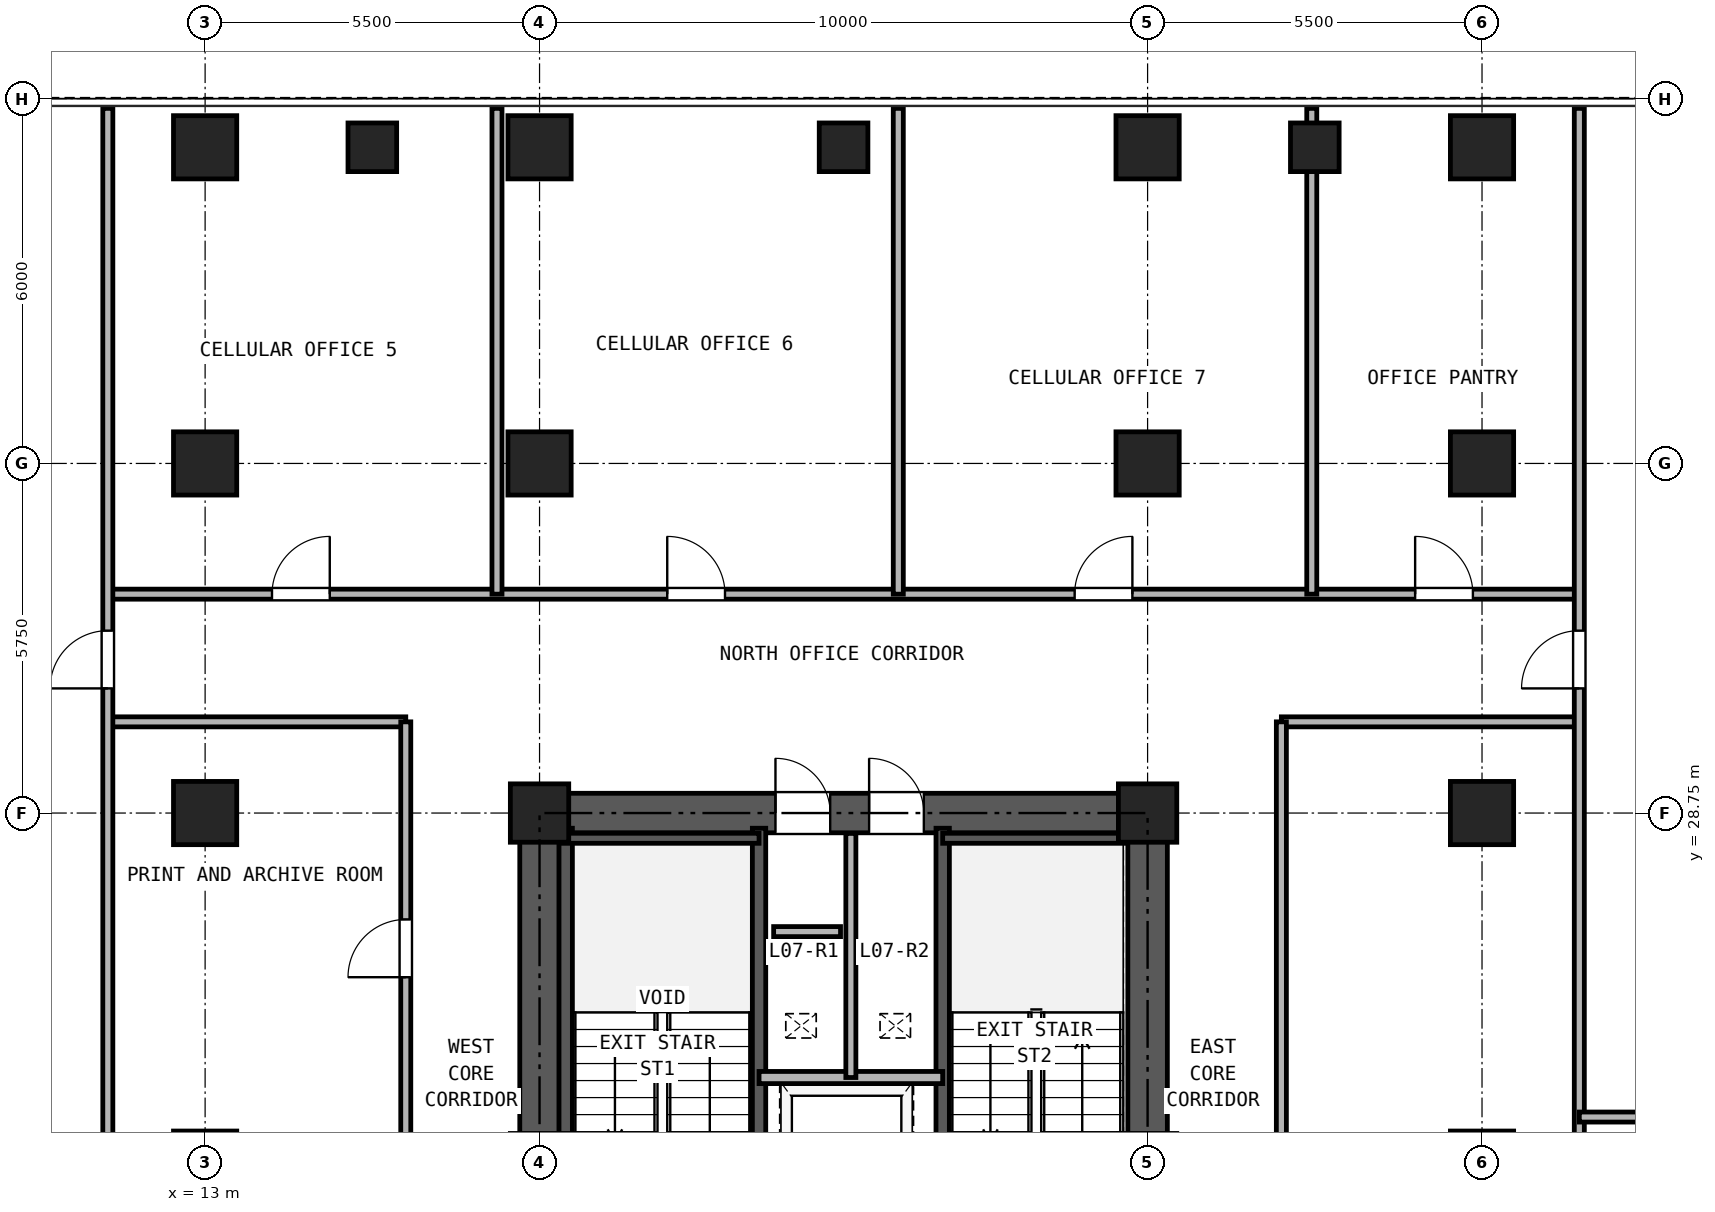
"""IFC4 building model, lengths in metres.
Left out: names, types, materials, properties, quantities, classifications, styles, units other than length and angle.
Written with IfcOpenShell. Run it as: python <this file> out.ifc"""

import sys

from ifc_helpers import new_model, si_unit, direction, frame, frame_2d, origin, origin_2d, place, context, subcontext, project, spatial, rectangle, hollow_rectangle, extrude, source, transform, mapped, element, fill, save


model = new_model("IFC4")
c1 = context("Model", 3, precision=1e-05, world=origin(), true_north=direction((0.0, 1.0)))
c2 = subcontext(c1, "Body", "Model", "MODEL_VIEW")
j1 = project(units=[si_unit("LENGTHUNIT", "METRE"), si_unit("PLANEANGLEUNIT", "RADIAN")], contexts=[c1])
p1 = place(None, origin())
s1 = spatial("IfcSite", under=j1, at=p1, CompositionType="ELEMENT")
p2 = place(p1, origin())
s2 = spatial("IfcBuilding", under=s1, at=p2, CompositionType="ELEMENT")
p3 = place(p2, frame((0.0, 0.0, 29.7)))
s3 = spatial("IfcBuildingStorey", under=s2, at=p3, CompositionType="ELEMENT", Elevation=29.7)
m1 = source(origin(), c2, "Body", "SweptSolid", [
    extrude(hollow_rectangle(XDim=1.04, YDim=1.04, WallThickness=0.065, at=origin_2d()), origin(), (0.0, 0.0, 1.0), 3.32),
])
for number, where, z_axis, x_axis in (
    (1, (13.0, 39.7, 0.0), (0.0, 0.0, 1.0), (1.0, 0.0, 0.0)),
    (2, (18.5, 39.7, 0.0), (0.0, 0.0, 1.0), (1.0, 0.0, 0.0)),
    (3, (28.5, 39.7, 0.0), (0.0, 0.0, 1.0), (1.0, 0.0, 0.0)),
    (4, (34.0, 39.7, 0.0), (0.0, 0.0, 1.0), (1.0, 0.0, 0.0)),
    (5, (13.0, 23.0, 0.0), (0.0, 0.0, 1.0), (1.0, 0.0, 0.0)),
    (6, (13.0, 28.75, 0.0), (0.0, 0.0, 1.0), (1.0, 0.0, 0.0)),
    (7, (13.0, 34.5, 0.0), (0.0, 0.0, 1.0), (1.0, 0.0, 0.0)),
):
    element("IfcColumn", number, at=place(p3, frame(where, z_axis=z_axis, x_axis=x_axis)), inside=s3, PredefinedType="COLUMN", context=c2, shape_type="MappedRepresentation", body=[
        mapped(m1, transform((0.0, 0.0, 0.0), x_axis=(1.0, 0.0, 0.0), y_axis=(0.0, 1.0, 0.0), z_axis=(0.0, 0.0, 1.0), scale=1.0)),
    ])
m2 = source(origin(), c2, "Body", "SweptSolid", [
    extrude(hollow_rectangle(XDim=0.96, YDim=0.96, WallThickness=0.06, at=origin_2d()), origin(), (0.0, 0.0, 1.0), 3.32),
])
p4 = place(p3, frame((18.5, 28.75, 0.0), z_axis=(0.0, 0.0, 1.0), x_axis=(1.0, 0.0, 0.0)))
e8 = element("IfcColumn", 8, at=p4, inside=s3, PredefinedType="COLUMN", context=c2, shape_type="MappedRepresentation", body=[
    mapped(m2, transform((0.0, 0.0, 0.0), x_axis=(1.0, 0.0, 0.0), y_axis=(0.0, 1.0, 0.0), z_axis=(0.0, 0.0, 1.0), scale=1.0)),
])
p5 = place(p3, frame((18.5, 34.5, 0.0), z_axis=(0.0, 0.0, 1.0), x_axis=(1.0, 0.0, 0.0)))
e9 = element("IfcColumn", 9, at=p5, inside=s3, PredefinedType="COLUMN", context=c2, shape_type="MappedRepresentation", body=[
    mapped(m1, transform((0.0, 0.0, 0.0), x_axis=(1.0, 0.0, 0.0), y_axis=(0.0, 1.0, 0.0), z_axis=(0.0, 0.0, 1.0), scale=1.0)),
])
p6 = place(p3, frame((28.5, 28.75, 0.0), z_axis=(0.0, 0.0, 1.0), x_axis=(1.0, 0.0, 0.0)))
e10 = element("IfcColumn", 10, at=p6, inside=s3, PredefinedType="COLUMN", context=c2, shape_type="MappedRepresentation", body=[
    mapped(m2, transform((0.0, 0.0, 0.0), x_axis=(1.0, 0.0, 0.0), y_axis=(0.0, 1.0, 0.0), z_axis=(0.0, 0.0, 1.0), scale=1.0)),
])
for number, where, z_axis, x_axis in (
    (11, (28.5, 34.5, 0.0), (0.0, 0.0, 1.0), (1.0, 0.0, 0.0)),
    (12, (34.0, 23.0, 0.0), (0.0, 0.0, 1.0), (1.0, 0.0, 0.0)),
    (13, (34.0, 28.75, 0.0), (0.0, 0.0, 1.0), (1.0, 0.0, 0.0)),
    (14, (34.0, 34.5, 0.0), (0.0, 0.0, 1.0), (1.0, 0.0, 0.0)),
):
    element("IfcColumn", number, at=place(p3, frame(where, z_axis=z_axis, x_axis=x_axis)), inside=s3, PredefinedType="COLUMN", context=c2, shape_type="MappedRepresentation", body=[
        mapped(m1, transform((0.0, 0.0, 0.0), x_axis=(1.0, 0.0, 0.0), y_axis=(0.0, 1.0, 0.0), z_axis=(0.0, 0.0, 1.0), scale=1.0)),
    ])
m3 = source(origin(), c2, "Body", "SweptSolid", [
    extrude(hollow_rectangle(XDim=0.8, YDim=0.8, WallThickness=0.045, at=origin_2d()), origin(), (0.0, 0.0, 1.0), 3.32),
])
for number, where, z_axis, x_axis in (
    (15, (15.75, 39.7, 0.0), (0.0, 0.0, 1.0), (1.0, 0.0, 0.0)),
    (16, (23.5, 39.7, 0.0), (0.0, 0.0, 1.0), (1.0, 0.0, 0.0)),
    (17, (31.25, 39.7, 0.0), (0.0, 0.0, 1.0), (1.0, 0.0, 0.0)),
):
    element("IfcColumn", number, at=place(p3, frame(where, z_axis=z_axis, x_axis=x_axis)), inside=s3, PredefinedType="COLUMN", context=c2, shape_type="MappedRepresentation", body=[
        mapped(m3, transform((0.0, 0.0, 0.0), x_axis=(1.0, 0.0, 0.0), y_axis=(0.0, 1.0, 0.0), z_axis=(0.0, 0.0, 1.0), scale=1.0)),
    ])
p7 = place(p3, frame((18.175, 28.75, 0.0), z_axis=(0.0, 0.0, 1.0), x_axis=(1.0, 0.0, 0.0)))
e18 = element("IfcWall", 18, at=p7, inside=s3, PredefinedType="SHEAR", context=c2, shape_type="SweptSolid", body=[
    extrude(rectangle(XDim=10.65, YDim=0.65, at=frame_2d((5.325, 0.0))), origin(), (0.0, 0.0, 1.0), 3.32),
])
p8 = place(p7, frame((4.205, 0.0, 0.0)))
e19 = element("IfcOpeningElement", 19, at=p8, cuts=e18, PredefinedType="OPENING", context=c2, shape_type="SweptSolid", body=[
    extrude(rectangle(XDim=0.9, YDim=2.05, at=frame_2d((0.45, 1.025))), frame((0.0, 0.335, 0.0), z_axis=(0.0, -1.0, 0.0), x_axis=(1.0, 0.0, 0.0)), (0.0, 0.0, 1.0), 0.67),
])
p9 = place(p7, frame((5.745, 0.0, 0.0)))
e20 = element("IfcOpeningElement", 20, at=p9, cuts=e18, PredefinedType="OPENING", context=c2, shape_type="SweptSolid", body=[
    extrude(rectangle(XDim=0.9, YDim=2.05, at=frame_2d((0.45, 1.025))), frame((0.0, 0.335, 0.0), z_axis=(0.0, -1.0, 0.0), x_axis=(1.0, 0.0, 0.0)), (0.0, 0.0, 1.0), 0.67),
])
p10 = place(p3, frame((18.5, 11.825, 0.0), z_axis=(0.0, 0.0, 1.0), x_axis=(0.0, 1.0, 0.0)))
e21 = element("IfcWall", 21, at=p10, inside=s3, PredefinedType="SHEAR", context=c2, shape_type="SweptSolid", body=[
    extrude(rectangle(XDim=16.6, YDim=0.65, at=frame_2d((8.3, 0.0))), origin(), (0.0, 0.0, 1.0), 3.32),
])
p11 = place(p10, frame((7.325, 0.0, 0.0)))
e22 = element("IfcOpeningElement", 22, at=p11, cuts=e21, PredefinedType="OPENING", context=c2, shape_type="SweptSolid", body=[
    extrude(rectangle(XDim=1.15, YDim=2.2, at=frame_2d((0.575, 1.1))), frame((0.0, 0.335, 0.0), z_axis=(0.0, -1.0, 0.0), x_axis=(1.0, 0.0, 0.0)), (0.0, 0.0, 1.0), 0.67),
])
p12 = place(p3, frame((28.5, 11.825, 0.0), z_axis=(0.0, 0.0, 1.0), x_axis=(0.0, 1.0, 0.0)))
e23 = element("IfcWall", 23, at=p12, inside=s3, PredefinedType="SHEAR", context=c2, shape_type="SweptSolid", body=[
    extrude(rectangle(XDim=16.6, YDim=0.65, at=frame_2d((8.3, 0.0))), origin(), (0.0, 0.0, 1.0), 3.32),
])
p13 = place(p12, frame((7.325, 0.0, 0.0)))
e24 = element("IfcOpeningElement", 24, at=p13, cuts=e23, PredefinedType="OPENING", context=c2, shape_type="SweptSolid", body=[
    extrude(rectangle(XDim=1.15, YDim=2.2, at=frame_2d((0.575, 1.1))), frame((0.0, 0.335, 0.0), z_axis=(0.0, -1.0, 0.0), x_axis=(1.0, 0.0, 0.0)), (0.0, 0.0, 1.0), 0.67),
])
for number, where, z_axis, x_axis in (
    (25, (18.93, 21.39, 0.0), (0.0, 0.0, 1.0), (0.0, 1.0, 0.0)),
    (26, (22.11, 21.39, 0.0), (0.0, 0.0, 1.0), (0.0, 1.0, 0.0)),
    (27, (25.13, 21.39, 0.0), (0.0, 0.0, 1.0), (0.0, 1.0, 0.0)),
):
    element("IfcWall", number, at=place(p3, frame(where, z_axis=z_axis, x_axis=x_axis)), inside=s3, PredefinedType="SOLIDWALL", context=c2, shape_type="SweptSolid", body=[
        extrude(rectangle(XDim=7.11, YDim=0.22, at=frame_2d((3.555, 0.0))), origin(), (0.0, 0.0, 1.0), 3.32),
    ])
p14 = place(p3, frame((18.835, 28.335, 0.0), z_axis=(0.0, 0.0, 1.0), x_axis=(1.0, 0.0, 0.0)))
e28 = element("IfcWall", 28, at=p14, inside=s3, PredefinedType="PARTITIONING", context=c2, shape_type="SweptSolid", body=[
    extrude(rectangle(XDim=3.275, YDim=0.165, at=frame_2d((1.638, 0.0))), origin(), (0.0, 0.0, 1.0), 3.32),
])
p15 = place(p3, frame((25.13, 28.335, 0.0), z_axis=(0.0, 0.0, 1.0), x_axis=(1.0, 0.0, 0.0)))
e29 = element("IfcWall", 29, at=p15, inside=s3, PredefinedType="PARTITIONING", context=c2, shape_type="SweptSolid", body=[
    extrude(rectangle(XDim=3.035, YDim=0.165, at=frame_2d((1.518, 0.0))), origin(), (0.0, 0.0, 1.0), 3.32),
])
p16 = place(p3, frame((22.11, 24.4, 0.0), z_axis=(0.0, 0.0, 1.0), x_axis=(1.0, 0.0, 0.0)))
e30 = element("IfcWall", 30, at=p16, inside=s3, PredefinedType="PARTITIONING", context=c2, shape_type="SweptSolid", body=[
    extrude(rectangle(XDim=3.02, YDim=0.2, at=frame_2d((1.51, 0.0))), origin(), (0.0, 0.0, 1.0), 3.32),
])
p17 = place(p3, frame((23.62, 24.4, 0.0), z_axis=(0.0, 0.0, 1.0), x_axis=(0.0, 1.0, 0.0)))
e31 = element("IfcWall", 31, at=p17, inside=s3, PredefinedType="PARTITIONING", context=c2, shape_type="SweptSolid", body=[
    extrude(rectangle(XDim=4.015, YDim=0.165, at=frame_2d((2.008, 0.0))), origin(), (0.0, 0.0, 1.0), 3.32),
])
p18 = place(p3, frame((11.4, 32.35, 0.0), z_axis=(0.0, 0.0, 1.0), x_axis=(1.0, 0.0, 0.0)))
e32 = element("IfcWall", 32, at=p18, inside=s3, PredefinedType="PARTITIONING", context=c2, shape_type="SweptSolid", body=[
    extrude(rectangle(XDim=24.2, YDim=0.165, at=frame_2d((12.1, 0.0))), origin(), (0.0, 0.0, 1.0), 3.32),
])
p19 = place(p18, frame((2.7, 0.0, 0.0)))
e33 = element("IfcOpeningElement", 33, at=p19, cuts=e32, PredefinedType="OPENING", context=c2, shape_type="SweptSolid", body=[
    extrude(rectangle(XDim=0.95, YDim=2.15, at=frame_2d((0.475, 1.075))), frame((0.0, 0.093, 0.0), z_axis=(0.0, -1.0, 0.0), x_axis=(1.0, 0.0, 0.0)), (0.0, 0.0, 1.0), 0.185),
])
p20 = place(p18, frame((9.2, 0.0, 0.0)))
e34 = element("IfcOpeningElement", 34, at=p20, cuts=e32, PredefinedType="OPENING", context=c2, shape_type="SweptSolid", body=[
    extrude(rectangle(XDim=0.95, YDim=2.15, at=frame_2d((0.475, 1.075))), frame((0.0, 0.093, 0.0), z_axis=(0.0, -1.0, 0.0), x_axis=(1.0, 0.0, 0.0)), (0.0, 0.0, 1.0), 0.185),
])
p21 = place(p18, frame((15.9, 0.0, 0.0)))
e35 = element("IfcOpeningElement", 35, at=p21, cuts=e32, PredefinedType="OPENING", context=c2, shape_type="SweptSolid", body=[
    extrude(rectangle(XDim=0.95, YDim=2.15, at=frame_2d((0.475, 1.075))), frame((0.0, 0.093, 0.0), z_axis=(0.0, -1.0, 0.0), x_axis=(1.0, 0.0, 0.0)), (0.0, 0.0, 1.0), 0.185),
])
p22 = place(p18, frame((21.5, 0.0, 0.0)))
e36 = element("IfcOpeningElement", 36, at=p22, cuts=e32, PredefinedType="OPENING", context=c2, shape_type="SweptSolid", body=[
    extrude(rectangle(XDim=0.95, YDim=2.15, at=frame_2d((0.475, 1.075))), frame((0.0, 0.093, 0.0), z_axis=(0.0, -1.0, 0.0), x_axis=(1.0, 0.0, 0.0)), (0.0, 0.0, 1.0), 0.185),
])
for number, where, z_axis, x_axis in (
    (37, (11.4, 30.25, 0.0), (0.0, 0.0, 1.0), (1.0, 0.0, 0.0)),
    (38, (30.7, 30.25, 0.0), (0.0, 0.0, 1.0), (1.0, 0.0, 0.0)),
):
    element("IfcWall", number, at=place(p3, frame(where, z_axis=z_axis, x_axis=x_axis)), inside=s3, PredefinedType="PARTITIONING", context=c2, shape_type="SweptSolid", body=[
        extrude(rectangle(XDim=4.9, YDim=0.165, at=frame_2d((2.45, 0.0))), origin(), (0.0, 0.0, 1.0), 3.32),
    ])
p23 = place(p3, frame((16.3, 9.45, 0.0), z_axis=(0.0, 0.0, 1.0), x_axis=(0.0, 1.0, 0.0)))
e39 = element("IfcWall", 39, at=p23, inside=s3, PredefinedType="PARTITIONING", context=c2, shape_type="SweptSolid", body=[
    extrude(rectangle(XDim=20.8, YDim=0.165, at=frame_2d((10.4, 0.0))), origin(), (0.0, 0.0, 1.0), 3.32),
])
p24 = place(p23, frame((6.2, 0.0, 0.0)))
e40 = element("IfcOpeningElement", 40, at=p24, cuts=e39, PredefinedType="OPENING", context=c2, shape_type="SweptSolid", body=[
    extrude(rectangle(XDim=0.95, YDim=2.15, at=frame_2d((0.475, 1.075))), frame((0.0, 0.093, 0.0), z_axis=(0.0, -1.0, 0.0), x_axis=(1.0, 0.0, 0.0)), (0.0, 0.0, 1.0), 0.185),
])
p25 = place(p23, frame((16.6, 0.0, 0.0)))
e41 = element("IfcOpeningElement", 41, at=p25, cuts=e39, PredefinedType="OPENING", context=c2, shape_type="SweptSolid", body=[
    extrude(rectangle(XDim=0.95, YDim=2.15, at=frame_2d((0.475, 1.075))), frame((0.0, 0.093, 0.0), z_axis=(0.0, -1.0, 0.0), x_axis=(1.0, 0.0, 0.0)), (0.0, 0.0, 1.0), 0.185),
])
p26 = place(p3, frame((30.7, 9.45, 0.0), z_axis=(0.0, 0.0, 1.0), x_axis=(0.0, 1.0, 0.0)))
e42 = element("IfcWall", 42, at=p26, inside=s3, PredefinedType="PARTITIONING", context=c2, shape_type="SweptSolid", body=[
    extrude(rectangle(XDim=20.8, YDim=0.165, at=frame_2d((10.4, 0.0))), origin(), (0.0, 0.0, 1.0), 3.32),
])
p27 = place(p26, frame((9.9, 0.0, 0.0)))
e43 = element("IfcOpeningElement", 43, at=p27, cuts=e42, PredefinedType="OPENING", context=c2, shape_type="SweptSolid", body=[
    extrude(rectangle(XDim=0.95, YDim=2.15, at=frame_2d((0.475, 1.075))), frame((0.0, 0.093, 0.0), z_axis=(0.0, -1.0, 0.0), x_axis=(1.0, 0.0, 0.0)), (0.0, 0.0, 1.0), 0.185),
])
p28 = place(p3, frame((11.4, 0.16, 0.0), z_axis=(0.0, 0.0, 1.0), x_axis=(0.0, 1.0, 0.0)))
e44 = element("IfcWall", 44, at=p28, inside=s3, PredefinedType="PARTITIONING", context=c2, shape_type="SweptSolid", body=[
    extrude(rectangle(XDim=40.18, YDim=0.165, at=frame_2d((20.09, 0.0))), origin(), (0.0, 0.0, 1.0), 3.32),
])
p29 = place(p28, frame((7.74, 0.0, 0.0)))
e45 = element("IfcOpeningElement", 45, at=p29, cuts=e44, PredefinedType="OPENING", context=c2, shape_type="SweptSolid", body=[
    extrude(rectangle(XDim=0.95, YDim=2.15, at=frame_2d((0.475, 1.075))), frame((0.0, 0.093, 0.0), z_axis=(0.0, -1.0, 0.0), x_axis=(1.0, 0.0, 0.0)), (0.0, 0.0, 1.0), 0.185),
])
p30 = place(p28, frame((30.64, 0.0, 0.0)))
e46 = element("IfcOpeningElement", 46, at=p30, cuts=e44, PredefinedType="OPENING", context=c2, shape_type="SweptSolid", body=[
    extrude(rectangle(XDim=0.95, YDim=2.15, at=frame_2d((0.475, 1.075))), frame((0.0, 0.093, 0.0), z_axis=(0.0, -1.0, 0.0), x_axis=(1.0, 0.0, 0.0)), (0.0, 0.0, 1.0), 0.185),
])
p31 = place(p3, frame((35.6, 0.16, 0.0), z_axis=(0.0, 0.0, 1.0), x_axis=(0.0, 1.0, 0.0)))
e47 = element("IfcWall", 47, at=p31, inside=s3, PredefinedType="PARTITIONING", context=c2, shape_type="SweptSolid", body=[
    extrude(rectangle(XDim=40.18, YDim=0.165, at=frame_2d((20.09, 0.0))), origin(), (0.0, 0.0, 1.0), 3.32),
])
p32 = place(p31, frame((7.74, 0.0, 0.0)))
e48 = element("IfcOpeningElement", 48, at=p32, cuts=e47, PredefinedType="OPENING", context=c2, shape_type="SweptSolid", body=[
    extrude(rectangle(XDim=0.95, YDim=2.15, at=frame_2d((0.475, 1.075))), frame((0.0, 0.093, 0.0), z_axis=(0.0, -1.0, 0.0), x_axis=(1.0, 0.0, 0.0)), (0.0, 0.0, 1.0), 0.185),
])
p33 = place(p31, frame((30.64, 0.0, 0.0)))
e49 = element("IfcOpeningElement", 49, at=p33, cuts=e47, PredefinedType="OPENING", context=c2, shape_type="SweptSolid", body=[
    extrude(rectangle(XDim=0.95, YDim=2.15, at=frame_2d((0.475, 1.075))), frame((0.0, 0.093, 0.0), z_axis=(0.0, -1.0, 0.0), x_axis=(1.0, 0.0, 0.0)), (0.0, 0.0, 1.0), 0.185),
])
for number, where, z_axis, x_axis in (
    (50, (17.8, 32.35, 0.0), (0.0, 0.0, 1.0), (0.0, 1.0, 0.0)),
    (51, (24.4, 32.35, 0.0), (0.0, 0.0, 1.0), (0.0, 1.0, 0.0)),
    (52, (31.2, 32.35, 0.0), (0.0, 0.0, 1.0), (0.0, 1.0, 0.0)),
):
    element("IfcWall", number, at=place(p3, frame(where, z_axis=z_axis, x_axis=x_axis)), inside=s3, PredefinedType="PARTITIONING", context=c2, shape_type="SweptSolid", body=[
        extrude(rectangle(XDim=7.99, YDim=0.165, at=frame_2d((3.995, 0.0))), origin(), (0.0, 0.0, 1.0), 3.32),
    ])
p34 = place(p3, frame((35.6, 23.75, 0.0), z_axis=(0.0, 0.0, 1.0), x_axis=(1.0, 0.0, 0.0)))
e53 = element("IfcWall", 53, at=p34, inside=s3, PredefinedType="PARTITIONING", context=c2, shape_type="SweptSolid", body=[
    extrude(rectangle(XDim=11.24, YDim=0.165, at=frame_2d((5.62, 0.0))), origin(), (0.0, 0.0, 1.0), 3.32),
])
p35 = place(p3, frame((22.35, 26.8, 0.0), z_axis=(0.0, 0.0, 1.0), x_axis=(1.0, 0.0, 0.0)))
e54 = element("IfcWall", 54, at=p35, inside=s3, PredefinedType="PARTITIONING", context=c2, shape_type="SweptSolid", body=[
    extrude(rectangle(XDim=1.1, YDim=0.165, at=frame_2d((0.55, 0.0))), origin(), (0.0, 0.0, 1.0), 3.32),
])
p36 = place(p8, origin())
e55 = element("IfcDoor", 55, at=p36, inside=s3, OperationType="SINGLE_SWING_LEFT", PredefinedType="DOOR", context=c2, shape_type="SweptSolid", body=[
    extrude(rectangle(XDim=0.9, YDim=2.05, at=frame_2d((0.45, 1.025))), frame((0.0, 0.025, 0.0), z_axis=(0.0, -1.0, 0.0), x_axis=(1.0, 0.0, 0.0)), (0.0, 0.0, 1.0), 0.05),
])
fill(e19, e55)
p37 = place(p9, origin())
e56 = element("IfcDoor", 56, at=p37, inside=s3, OperationType="SINGLE_SWING_LEFT", PredefinedType="DOOR", context=c2, shape_type="SweptSolid", body=[
    extrude(rectangle(XDim=0.9, YDim=2.05, at=frame_2d((0.45, 1.025))), frame((0.0, 0.025, 0.0), z_axis=(0.0, -1.0, 0.0), x_axis=(1.0, 0.0, 0.0)), (0.0, 0.0, 1.0), 0.05),
])
fill(e20, e56)
p38 = place(p19, origin())
e57 = element("IfcDoor", 57, at=p38, inside=s3, OperationType="SINGLE_SWING_RIGHT", PredefinedType="DOOR", context=c2, shape_type="SweptSolid", body=[
    extrude(rectangle(XDim=0.95, YDim=2.15, at=frame_2d((0.475, 1.075))), frame((0.0, 0.025, 0.0), z_axis=(0.0, -1.0, 0.0), x_axis=(1.0, 0.0, 0.0)), (0.0, 0.0, 1.0), 0.05),
])
fill(e33, e57)
p39 = place(p20, origin())
e58 = element("IfcDoor", 58, at=p39, inside=s3, OperationType="SINGLE_SWING_LEFT", PredefinedType="DOOR", context=c2, shape_type="SweptSolid", body=[
    extrude(rectangle(XDim=0.95, YDim=2.15, at=frame_2d((0.475, 1.075))), frame((0.0, 0.025, 0.0), z_axis=(0.0, -1.0, 0.0), x_axis=(1.0, 0.0, 0.0)), (0.0, 0.0, 1.0), 0.05),
])
fill(e34, e58)
p40 = place(p21, origin())
e59 = element("IfcDoor", 59, at=p40, inside=s3, OperationType="SINGLE_SWING_RIGHT", PredefinedType="DOOR", context=c2, shape_type="SweptSolid", body=[
    extrude(rectangle(XDim=0.95, YDim=2.15, at=frame_2d((0.475, 1.075))), frame((0.0, 0.025, 0.0), z_axis=(0.0, -1.0, 0.0), x_axis=(1.0, 0.0, 0.0)), (0.0, 0.0, 1.0), 0.05),
])
fill(e35, e59)
p41 = place(p22, origin())
e60 = element("IfcDoor", 60, at=p41, inside=s3, OperationType="SINGLE_SWING_LEFT", PredefinedType="DOOR", context=c2, shape_type="SweptSolid", body=[
    extrude(rectangle(XDim=0.95, YDim=2.15, at=frame_2d((0.475, 1.075))), frame((0.0, 0.025, 0.0), z_axis=(0.0, -1.0, 0.0), x_axis=(1.0, 0.0, 0.0)), (0.0, 0.0, 1.0), 0.05),
])
fill(e36, e60)
p42 = place(p30, frame((0.95, 0.0, 0.0), z_axis=(0.0, 0.0, 1.0), x_axis=(-1.0, 0.0, 0.0)))
e61 = element("IfcDoor", 61, at=p42, inside=s3, OperationType="SINGLE_SWING_LEFT", PredefinedType="DOOR", context=c2, shape_type="SweptSolid", body=[
    extrude(rectangle(XDim=0.95, YDim=2.15, at=frame_2d((0.475, 1.075))), frame((0.0, 0.025, 0.0), z_axis=(0.0, -1.0, 0.0), x_axis=(1.0, 0.0, 0.0)), (0.0, 0.0, 1.0), 0.05),
])
fill(e46, e61)
p43 = place(p33, origin())
e62 = element("IfcDoor", 62, at=p43, inside=s3, OperationType="SINGLE_SWING_LEFT", PredefinedType="DOOR", context=c2, shape_type="SweptSolid", body=[
    extrude(rectangle(XDim=0.95, YDim=2.15, at=frame_2d((0.475, 1.075))), frame((0.0, 0.025, 0.0), z_axis=(0.0, -1.0, 0.0), x_axis=(1.0, 0.0, 0.0)), (0.0, 0.0, 1.0), 0.05),
])
fill(e49, e62)
p44 = place(p25, frame((0.95, 0.0, 0.0), z_axis=(0.0, 0.0, 1.0), x_axis=(-1.0, 0.0, 0.0)))
e63 = element("IfcDoor", 63, at=p44, inside=s3, OperationType="SINGLE_SWING_LEFT", PredefinedType="DOOR", context=c2, shape_type="SweptSolid", body=[
    extrude(rectangle(XDim=0.95, YDim=2.15, at=frame_2d((0.475, 1.075))), frame((0.0, 0.025, 0.0), z_axis=(0.0, -1.0, 0.0), x_axis=(1.0, 0.0, 0.0)), (0.0, 0.0, 1.0), 0.05),
])
fill(e41, e63)
save(model, sys.argv[1])
